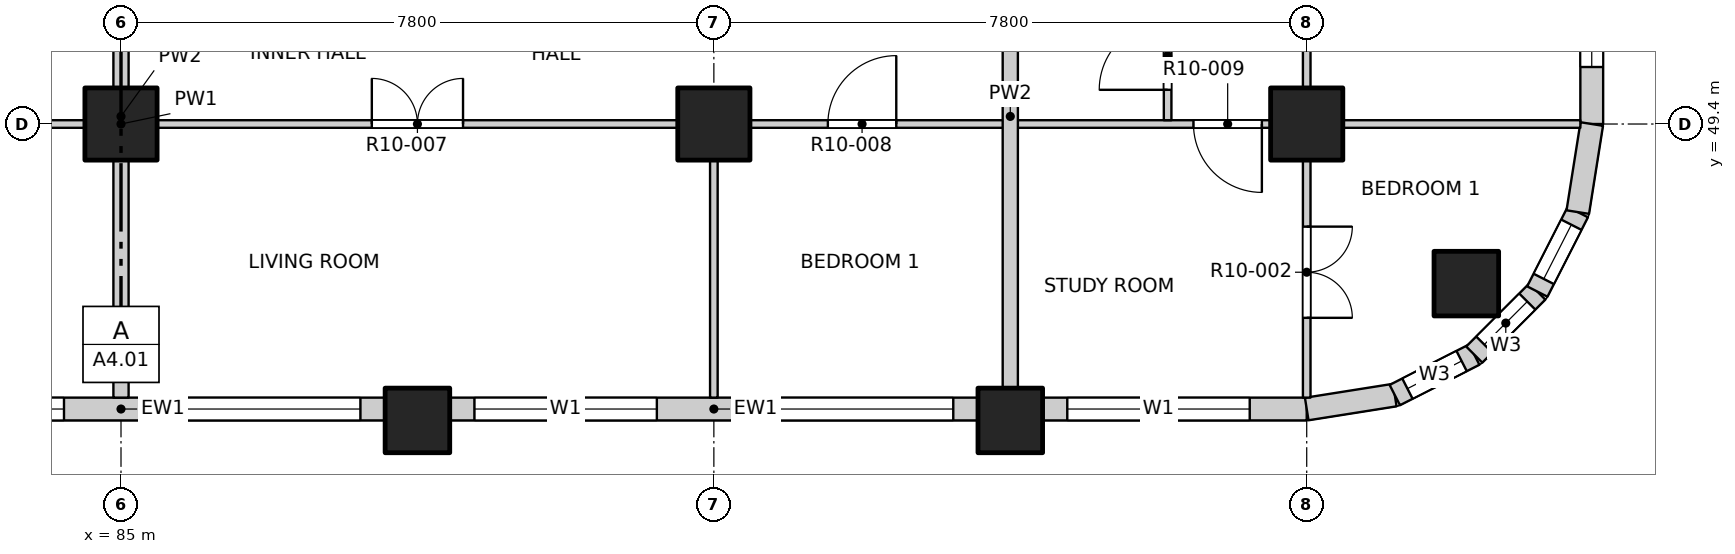
"""IFC4 building model, lengths in metres.
Left out: names, types, materials, properties, quantities, classifications, styles, units other than length and angle.
Written with IfcOpenShell. Run it as: python <this file> out.ifc"""

import sys

from ifc_helpers import new_model, si_unit, direction, frame, frame_2d, origin, origin_2d, place, context, subcontext, project, spatial, rectangle, extrude, element, fill, save


model = new_model("IFC4")
c1 = context("Model", 3, precision=1e-05, world=origin(), true_north=direction((0.0, 1.0)))
c2 = subcontext(c1, "Body", "Model", "MODEL_VIEW")
j1 = project(units=[si_unit("LENGTHUNIT", "METRE"), si_unit("PLANEANGLEUNIT", "RADIAN")], contexts=[c1])
p1 = place(None, origin())
s1 = spatial("IfcSite", under=j1, at=p1, CompositionType="ELEMENT")
p2 = place(p1, origin())
s2 = spatial("IfcBuilding", under=s1, at=p2, CompositionType="ELEMENT")
p3 = place(p2, frame((0.0, 0.0, 127.1)))
s3 = spatial("IfcBuildingStorey", under=s2, at=p3, CompositionType="ELEMENT", Elevation=127.1)
for number, where, z_axis, x_axis in (
    (1, (102.7, 47.3, -0.25), (0.0, 0.0, 1.0), (1.0, 0.0, 0.0)),
    (2, (88.9, 45.5, -0.25), (0.0, 0.0, 1.0), (1.0, 0.0, 0.0)),
    (3, (96.7, 45.5, -0.25), (0.0, 0.0, 1.0), (1.0, 0.0, 0.0)),
):
    element("IfcColumn", number, at=place(p3, frame(where, z_axis=z_axis, x_axis=x_axis)), inside=s3, PredefinedType="COLUMN", context=c2, shape_type="SweptSolid", body=[
        extrude(rectangle(XDim=0.85, YDim=0.85, at=origin_2d()), origin(), (0.0, 0.0, 1.0), 3.4),
    ])
for number, where, z_axis, x_axis in (
    (4, (85.0, 49.4, -0.25), (0.0, 0.0, 1.0), (1.0, 0.0, 0.0)),
    (5, (92.8, 49.4, -0.25), (0.0, 0.0, 1.0), (1.0, 0.0, 0.0)),
    (6, (100.6, 49.4, -0.25), (0.0, 0.0, 1.0), (1.0, 0.0, 0.0)),
):
    element("IfcColumn", number, at=place(p3, frame(where, z_axis=z_axis, x_axis=x_axis)), inside=s3, PredefinedType="COLUMN", context=c2, shape_type="SweptSolid", body=[
        extrude(rectangle(XDim=0.95, YDim=0.95, at=origin_2d()), origin(), (0.0, 0.0, 1.0), 3.4),
    ])
p4 = place(p3, frame((81.525, 45.65, 0.0), z_axis=(0.0, 0.0, 1.0), x_axis=(1.0, 0.0, 0.0)))
e7 = element("IfcWall", 7, at=p4, inside=s3, PredefinedType="SOLIDWALL", context=c2, shape_type="SweptSolid", body=[
    extrude(rectangle(XDim=6.95, YDim=0.3, at=frame_2d((3.475, 0.0))), origin(), (0.0, 0.0, 1.0), 2.7),
])
p5 = place(p4, frame((0.325, 0.0, 0.9)))
e8 = element("IfcOpeningElement", 8, at=p5, cuts=e7, PredefinedType="OPENING", context=c2, shape_type="SweptSolid", body=[
    extrude(rectangle(XDim=2.4, YDim=1.8, at=frame_2d((1.2, 0.9))), frame((0.0, 0.16, 0.0), z_axis=(0.0, -1.0, 0.0), x_axis=(1.0, 0.0, 0.0)), (0.0, 0.0, 1.0), 0.32),
])
p6 = place(p4, frame((4.225, 0.0, 0.9)))
e9 = element("IfcOpeningElement", 9, at=p6, cuts=e7, PredefinedType="OPENING", context=c2, shape_type="SweptSolid", body=[
    extrude(rectangle(XDim=2.4, YDim=1.8, at=frame_2d((1.2, 0.9))), frame((0.0, 0.16, 0.0), z_axis=(0.0, -1.0, 0.0), x_axis=(1.0, 0.0, 0.0)), (0.0, 0.0, 1.0), 0.32),
])
p7 = place(p3, frame((89.325, 45.65, 0.0), z_axis=(0.0, 0.0, 1.0), x_axis=(1.0, 0.0, 0.0)))
e10 = element("IfcWall", 10, at=p7, inside=s3, PredefinedType="SOLIDWALL", context=c2, shape_type="SweptSolid", body=[
    extrude(rectangle(XDim=6.95, YDim=0.3, at=frame_2d((3.475, 0.0))), origin(), (0.0, 0.0, 1.0), 2.7),
])
p8 = place(p7, frame((0.325, 0.0, 0.9)))
e11 = element("IfcOpeningElement", 11, at=p8, cuts=e10, PredefinedType="OPENING", context=c2, shape_type="SweptSolid", body=[
    extrude(rectangle(XDim=2.4, YDim=1.8, at=frame_2d((1.2, 0.9))), frame((0.0, 0.16, 0.0), z_axis=(0.0, -1.0, 0.0), x_axis=(1.0, 0.0, 0.0)), (0.0, 0.0, 1.0), 0.32),
])
p9 = place(p7, frame((4.225, 0.0, 0.9)))
e12 = element("IfcOpeningElement", 12, at=p9, cuts=e10, PredefinedType="OPENING", context=c2, shape_type="SweptSolid", body=[
    extrude(rectangle(XDim=2.4, YDim=1.8, at=frame_2d((1.2, 0.9))), frame((0.0, 0.16, 0.0), z_axis=(0.0, -1.0, 0.0), x_axis=(1.0, 0.0, 0.0)), (0.0, 0.0, 1.0), 0.32),
])
p10 = place(p3, frame((97.125, 45.65, 0.0), z_axis=(0.0, 0.0, 1.0), x_axis=(1.0, 0.0, 0.0)))
e13 = element("IfcWall", 13, at=p10, inside=s3, PredefinedType="SOLIDWALL", context=c2, shape_type="SweptSolid", body=[
    extrude(rectangle(XDim=3.475, YDim=0.3, at=frame_2d((1.738, 0.0))), origin(), (0.0, 0.0, 1.0), 2.7),
])
p11 = place(p10, frame((0.325, 0.0, 0.9)))
e14 = element("IfcOpeningElement", 14, at=p11, cuts=e13, PredefinedType="OPENING", context=c2, shape_type="SweptSolid", body=[
    extrude(rectangle(XDim=2.4, YDim=1.8, at=frame_2d((1.2, 0.9))), frame((0.0, 0.16, 0.0), z_axis=(0.0, -1.0, 0.0), x_axis=(1.0, 0.0, 0.0)), (0.0, 0.0, 1.0), 0.32),
])
p12 = place(p3, frame((104.35, 49.4, 0.0), z_axis=(0.0, 0.0, 1.0), x_axis=(0.0, 1.0, 0.0)))
e15 = element("IfcWall", 15, at=p12, inside=s3, PredefinedType="SOLIDWALL", context=c2, shape_type="SweptSolid", body=[
    extrude(rectangle(XDim=3.475, YDim=0.3, at=frame_2d((1.738, 0.0))), origin(), (0.0, 0.0, 1.0), 2.7),
])
p13 = place(p12, frame((0.75, 0.0, 0.9)))
e16 = element("IfcOpeningElement", 16, at=p13, cuts=e15, PredefinedType="OPENING", context=c2, shape_type="SweptSolid", body=[
    extrude(rectangle(XDim=2.4, YDim=1.8, at=frame_2d((1.2, 0.9))), frame((0.0, 0.16, 0.0), z_axis=(0.0, -1.0, 0.0), x_axis=(1.0, 0.0, 0.0)), (0.0, 0.0, 1.0), 0.32),
])
p14 = place(p3, frame((100.6, 45.65, 0.0), z_axis=(0.0, 0.0, 1.0), x_axis=(0.987678452879, 0.156496880861, 0.0)))
e17 = element("IfcWall", 17, at=p14, inside=s3, PredefinedType="SOLIDWALL", context=c2, shape_type="SweptSolid", body=[
    extrude(rectangle(XDim=1.173, YDim=0.3, at=frame_2d((0.586, 0.0))), origin(), (0.0, 0.0, 1.0), 2.7),
])
p15 = place(p3, frame((101.759, 45.833, 0.0), z_axis=(0.0, 0.0, 1.0), x_axis=(0.890988677504, 0.454025524128, 0.0)))
e18 = element("IfcWall", 18, at=p15, inside=s3, PredefinedType="SOLIDWALL", context=c2, shape_type="SweptSolid", body=[
    extrude(rectangle(XDim=1.173, YDim=0.3, at=frame_2d((0.587, 0.0))), origin(), (0.0, 0.0, 1.0), 2.7),
])
p16 = place(p15, frame((0.187, 0.0, 0.9)))
e19 = element("IfcOpeningElement", 19, at=p16, cuts=e18, PredefinedType="OPENING", context=c2, shape_type="SweptSolid", body=[
    extrude(rectangle(XDim=0.8, YDim=1.2, at=frame_2d((0.4, 0.6))), frame((0.0, 0.16, 0.0), z_axis=(0.0, -1.0, 0.0), x_axis=(1.0, 0.0, 0.0)), (0.0, 0.0, 1.0), 0.32),
])
p17 = place(p3, frame((102.804, 46.366, 0.0), z_axis=(0.0, 0.0, 1.0), x_axis=(0.707106781187, 0.707106781187, 0.0)))
e20 = element("IfcWall", 20, at=p17, inside=s3, PredefinedType="SOLIDWALL", context=c2, shape_type="SweptSolid", body=[
    extrude(rectangle(XDim=1.173, YDim=0.3, at=frame_2d((0.586, 0.0))), origin(), (0.0, 0.0, 1.0), 2.7),
])
p18 = place(p17, frame((0.187, 0.0, 0.9)))
e21 = element("IfcOpeningElement", 21, at=p18, cuts=e20, PredefinedType="OPENING", context=c2, shape_type="SweptSolid", body=[
    extrude(rectangle(XDim=0.8, YDim=1.2, at=frame_2d((0.4, 0.6))), frame((0.0, 0.16, 0.0), z_axis=(0.0, -1.0, 0.0), x_axis=(1.0, 0.0, 0.0)), (0.0, 0.0, 1.0), 0.32),
])
p19 = place(p3, frame((103.634, 47.196, 0.0), z_axis=(0.0, 0.0, 1.0), x_axis=(0.454025524128, 0.890988677504, 0.0)))
e22 = element("IfcWall", 22, at=p19, inside=s3, PredefinedType="SOLIDWALL", context=c2, shape_type="SweptSolid", body=[
    extrude(rectangle(XDim=1.173, YDim=0.3, at=frame_2d((0.587, 0.0))), origin(), (0.0, 0.0, 1.0), 2.7),
])
p20 = place(p19, frame((0.187, 0.0, 0.9)))
e23 = element("IfcOpeningElement", 23, at=p20, cuts=e22, PredefinedType="OPENING", context=c2, shape_type="SweptSolid", body=[
    extrude(rectangle(XDim=0.8, YDim=1.2, at=frame_2d((0.4, 0.6))), frame((0.0, 0.16, 0.0), z_axis=(0.0, -1.0, 0.0), x_axis=(1.0, 0.0, 0.0)), (0.0, 0.0, 1.0), 0.32),
])
p21 = place(p3, frame((104.167, 48.241, 0.0), z_axis=(0.0, 0.0, 1.0), x_axis=(0.156496880861, 0.987678452879, 0.0)))
e24 = element("IfcWall", 24, at=p21, inside=s3, PredefinedType="SOLIDWALL", context=c2, shape_type="SweptSolid", body=[
    extrude(rectangle(XDim=1.173, YDim=0.3, at=frame_2d((0.586, 0.0))), origin(), (0.0, 0.0, 1.0), 2.7),
])
p22 = place(p3, frame((65.8, 49.4, 0.0), z_axis=(0.0, 0.0, 1.0), x_axis=(1.0, 0.0, 0.0)))
e25 = element("IfcWall", 25, at=p22, inside=s3, PredefinedType="PARTITIONING", context=c2, shape_type="SweptSolid", body=[
    extrude(rectangle(XDim=38.4, YDim=0.1, at=frame_2d((19.2, 0.0))), origin(), (0.0, 0.0, 1.0), 3.15),
])
p23 = place(p22, frame((4.19, 0.0, 0.0)))
e26 = element("IfcOpeningElement", 26, at=p23, cuts=e25, PredefinedType="OPENING", context=c2, shape_type="SweptSolid", body=[
    extrude(rectangle(XDim=0.9, YDim=2.1, at=frame_2d((0.45, 1.05))), frame((0.0, 0.06, 0.0), z_axis=(0.0, -1.0, 0.0), x_axis=(1.0, 0.0, 0.0)), (0.0, 0.0, 1.0), 0.12),
])
p24 = place(p22, frame((9.0, 0.0, 0.0)))
e27 = element("IfcOpeningElement", 27, at=p24, cuts=e25, PredefinedType="OPENING", context=c2, shape_type="SweptSolid", body=[
    extrude(rectangle(XDim=0.9, YDim=2.1, at=frame_2d((0.45, 1.05))), frame((0.0, 0.06, 0.0), z_axis=(0.0, -1.0, 0.0), x_axis=(1.0, 0.0, 0.0)), (0.0, 0.0, 1.0), 0.12),
])
p25 = place(p22, frame((12.9, 0.0, 0.0)))
e28 = element("IfcOpeningElement", 28, at=p25, cuts=e25, PredefinedType="OPENING", context=c2, shape_type="SweptSolid", body=[
    extrude(rectangle(XDim=0.9, YDim=2.1, at=frame_2d((0.45, 1.05))), frame((0.0, 0.06, 0.0), z_axis=(0.0, -1.0, 0.0), x_axis=(1.0, 0.0, 0.0)), (0.0, 0.0, 1.0), 0.12),
])
p26 = place(p22, frame((16.8, 0.0, 0.0)))
e29 = element("IfcOpeningElement", 29, at=p26, cuts=e25, PredefinedType="OPENING", context=c2, shape_type="SweptSolid", body=[
    extrude(rectangle(XDim=0.9, YDim=2.1, at=frame_2d((0.45, 1.05))), frame((0.0, 0.06, 0.0), z_axis=(0.0, -1.0, 0.0), x_axis=(1.0, 0.0, 0.0)), (0.0, 0.0, 1.0), 0.12),
])
p27 = place(p22, frame((22.5, 0.0, 0.0)))
e30 = element("IfcOpeningElement", 30, at=p27, cuts=e25, PredefinedType="OPENING", context=c2, shape_type="SweptSolid", body=[
    extrude(rectangle(XDim=1.2, YDim=2.1, at=frame_2d((0.6, 1.05))), frame((0.0, 0.06, 0.0), z_axis=(0.0, -1.0, 0.0), x_axis=(1.0, 0.0, 0.0)), (0.0, 0.0, 1.0), 0.12),
])
p28 = place(p22, frame((28.5, 0.0, 0.0)))
e31 = element("IfcOpeningElement", 31, at=p28, cuts=e25, PredefinedType="OPENING", context=c2, shape_type="SweptSolid", body=[
    extrude(rectangle(XDim=0.9, YDim=2.1, at=frame_2d((0.45, 1.05))), frame((0.0, 0.06, 0.0), z_axis=(0.0, -1.0, 0.0), x_axis=(1.0, 0.0, 0.0)), (0.0, 0.0, 1.0), 0.12),
])
p29 = place(p22, frame((33.31, 0.0, 0.0)))
e32 = element("IfcOpeningElement", 32, at=p29, cuts=e25, PredefinedType="OPENING", context=c2, shape_type="SweptSolid", body=[
    extrude(rectangle(XDim=0.9, YDim=2.1, at=frame_2d((0.45, 1.05))), frame((0.0, 0.06, 0.0), z_axis=(0.0, -1.0, 0.0), x_axis=(1.0, 0.0, 0.0)), (0.0, 0.0, 1.0), 0.12),
])
p30 = place(p3, frame((85.0, 45.8, 0.0), z_axis=(0.0, 0.0, 1.0), x_axis=(0.0, 1.0, 0.0)))
e33 = element("IfcWall", 33, at=p30, inside=s3, PredefinedType="PARTITIONING", context=c2, shape_type="SweptSolid", body=[
    extrude(rectangle(XDim=7.4, YDim=0.2, at=frame_2d((3.7, 0.0))), origin(), (0.0, 0.0, 1.0), 3.15),
])
p31 = place(p3, frame((92.8, 45.8, 0.0), z_axis=(0.0, 0.0, 1.0), x_axis=(0.0, 1.0, 0.0)))
e34 = element("IfcWall", 34, at=p31, inside=s3, PredefinedType="PARTITIONING", context=c2, shape_type="SweptSolid", body=[
    extrude(rectangle(XDim=3.55, YDim=0.1, at=frame_2d((1.775, 0.0))), origin(), (0.0, 0.0, 1.0), 3.15),
])
p32 = place(p3, frame((96.7, 45.8, 0.0), z_axis=(0.0, 0.0, 1.0), x_axis=(0.0, 1.0, 0.0)))
e35 = element("IfcWall", 35, at=p32, inside=s3, PredefinedType="PARTITIONING", context=c2, shape_type="SweptSolid", body=[
    extrude(rectangle(XDim=7.4, YDim=0.2, at=frame_2d((3.7, 0.0))), origin(), (0.0, 0.0, 1.0), 3.15),
])
p33 = place(p3, frame((98.77, 49.45, 0.0), z_axis=(0.0, 0.0, 1.0), x_axis=(0.0, 1.0, 0.0)))
e36 = element("IfcWall", 36, at=p33, inside=s3, PredefinedType="PARTITIONING", context=c2, shape_type="SweptSolid", body=[
    extrude(rectangle(XDim=12.35, YDim=0.1, at=frame_2d((6.175, 0.0))), origin(), (0.0, 0.0, 1.0), 3.15),
])
p34 = place(p33, frame((0.4, 0.0, 0.0)))
e37 = element("IfcOpeningElement", 37, at=p34, cuts=e36, PredefinedType="OPENING", context=c2, shape_type="SweptSolid", body=[
    extrude(rectangle(XDim=0.9, YDim=2.1, at=frame_2d((0.45, 1.05))), frame((0.0, 0.06, 0.0), z_axis=(0.0, -1.0, 0.0), x_axis=(1.0, 0.0, 0.0)), (0.0, 0.0, 1.0), 0.12),
])
p35 = place(p33, frame((2.65, 0.0, 0.0)))
e38 = element("IfcOpeningElement", 38, at=p35, cuts=e36, PredefinedType="OPENING", context=c2, shape_type="SweptSolid", body=[
    extrude(rectangle(XDim=0.8, YDim=2.1, at=frame_2d((0.4, 1.05))), frame((0.0, 0.06, 0.0), z_axis=(0.0, -1.0, 0.0), x_axis=(1.0, 0.0, 0.0)), (0.0, 0.0, 1.0), 0.12),
])
p36 = place(p33, frame((5.29, 0.0, 0.0)))
e39 = element("IfcOpeningElement", 39, at=p36, cuts=e36, PredefinedType="OPENING", context=c2, shape_type="SweptSolid", body=[
    extrude(rectangle(XDim=0.8, YDim=2.1, at=frame_2d((0.4, 1.05))), frame((0.0, 0.06, 0.0), z_axis=(0.0, -1.0, 0.0), x_axis=(1.0, 0.0, 0.0)), (0.0, 0.0, 1.0), 0.12),
])
p37 = place(p33, frame((8.115, 0.0, 0.0)))
e40 = element("IfcOpeningElement", 40, at=p37, cuts=e36, PredefinedType="OPENING", context=c2, shape_type="SweptSolid", body=[
    extrude(rectangle(XDim=0.9, YDim=2.1, at=frame_2d((0.45, 1.05))), frame((0.0, 0.06, 0.0), z_axis=(0.0, -1.0, 0.0), x_axis=(1.0, 0.0, 0.0)), (0.0, 0.0, 1.0), 0.12),
])
p38 = place(p33, frame((10.85, 0.0, 0.0)))
e41 = element("IfcOpeningElement", 41, at=p38, cuts=e36, PredefinedType="OPENING", context=c2, shape_type="SweptSolid", body=[
    extrude(rectangle(XDim=0.8, YDim=2.1, at=frame_2d((0.4, 1.05))), frame((0.0, 0.06, 0.0), z_axis=(0.0, -1.0, 0.0), x_axis=(1.0, 0.0, 0.0)), (0.0, 0.0, 1.0), 0.12),
])
p39 = place(p3, frame((100.6, 45.8, 0.0), z_axis=(0.0, 0.0, 1.0), x_axis=(0.0, 1.0, 0.0)))
e42 = element("IfcWall", 42, at=p39, inside=s3, PredefinedType="PARTITIONING", context=c2, shape_type="SweptSolid", body=[
    extrude(rectangle(XDim=38.4, YDim=0.1, at=frame_2d((19.2, 0.0))), origin(), (0.0, 0.0, 1.0), 3.15),
])
p40 = place(p39, frame((1.05, 0.0, 0.0)))
e43 = element("IfcOpeningElement", 43, at=p40, cuts=e42, PredefinedType="OPENING", context=c2, shape_type="SweptSolid", body=[
    extrude(rectangle(XDim=1.2, YDim=2.1, at=frame_2d((0.6, 1.05))), frame((0.0, 0.06, 0.0), z_axis=(0.0, -1.0, 0.0), x_axis=(1.0, 0.0, 0.0)), (0.0, 0.0, 1.0), 0.12),
])
p41 = place(p39, frame((6.9, 0.0, 0.0)))
e44 = element("IfcOpeningElement", 44, at=p41, cuts=e42, PredefinedType="OPENING", context=c2, shape_type="SweptSolid", body=[
    extrude(rectangle(XDim=1.2, YDim=2.1, at=frame_2d((0.6, 1.05))), frame((0.0, 0.06, 0.0), z_axis=(0.0, -1.0, 0.0), x_axis=(1.0, 0.0, 0.0)), (0.0, 0.0, 1.0), 0.12),
])
p42 = place(p39, frame((12.9, 0.0, 0.0)))
e45 = element("IfcOpeningElement", 45, at=p42, cuts=e42, PredefinedType="OPENING", context=c2, shape_type="SweptSolid", body=[
    extrude(rectangle(XDim=0.9, YDim=2.1, at=frame_2d((0.45, 1.05))), frame((0.0, 0.06, 0.0), z_axis=(0.0, -1.0, 0.0), x_axis=(1.0, 0.0, 0.0)), (0.0, 0.0, 1.0), 0.12),
])
p43 = place(p39, frame((16.8, 0.0, 0.0)))
e46 = element("IfcOpeningElement", 46, at=p43, cuts=e42, PredefinedType="OPENING", context=c2, shape_type="SweptSolid", body=[
    extrude(rectangle(XDim=0.9, YDim=2.1, at=frame_2d((0.45, 1.05))), frame((0.0, 0.06, 0.0), z_axis=(0.0, -1.0, 0.0), x_axis=(1.0, 0.0, 0.0)), (0.0, 0.0, 1.0), 0.12),
])
p44 = place(p39, frame((20.7, 0.0, 0.0)))
e47 = element("IfcOpeningElement", 47, at=p44, cuts=e42, PredefinedType="OPENING", context=c2, shape_type="SweptSolid", body=[
    extrude(rectangle(XDim=0.9, YDim=2.1, at=frame_2d((0.45, 1.05))), frame((0.0, 0.06, 0.0), z_axis=(0.0, -1.0, 0.0), x_axis=(1.0, 0.0, 0.0)), (0.0, 0.0, 1.0), 0.12),
])
p45 = place(p39, frame((27.575, 0.0, 0.0)))
e48 = element("IfcOpeningElement", 48, at=p45, cuts=e42, PredefinedType="OPENING", context=c2, shape_type="SweptSolid", body=[
    extrude(rectangle(XDim=1.2, YDim=2.1, at=frame_2d((0.6, 1.05))), frame((0.0, 0.06, 0.0), z_axis=(0.0, -1.0, 0.0), x_axis=(1.0, 0.0, 0.0)), (0.0, 0.0, 1.0), 0.12),
])
p46 = place(p39, frame((32.4, 0.0, 0.0)))
e49 = element("IfcOpeningElement", 49, at=p46, cuts=e42, PredefinedType="OPENING", context=c2, shape_type="SweptSolid", body=[
    extrude(rectangle(XDim=0.9, YDim=2.1, at=frame_2d((0.45, 1.05))), frame((0.0, 0.06, 0.0), z_axis=(0.0, -1.0, 0.0), x_axis=(1.0, 0.0, 0.0)), (0.0, 0.0, 1.0), 0.12),
])
p47 = place(p39, frame((36.15, 0.0, 0.0)))
e50 = element("IfcOpeningElement", 50, at=p47, cuts=e42, PredefinedType="OPENING", context=c2, shape_type="SweptSolid", body=[
    extrude(rectangle(XDim=1.2, YDim=2.1, at=frame_2d((0.6, 1.05))), frame((0.0, 0.06, 0.0), z_axis=(0.0, -1.0, 0.0), x_axis=(1.0, 0.0, 0.0)), (0.0, 0.0, 1.0), 0.12),
])
p48 = place(p5, origin())
e51 = element("IfcWindow", 51, at=p48, inside=s3, PartitioningType="DOUBLE_PANEL_VERTICAL", PredefinedType="WINDOW", context=c2, shape_type="SweptSolid", body=[
    extrude(rectangle(XDim=2.4, YDim=1.8, at=frame_2d((1.2, 0.9))), frame((0.0, 0.03, 0.0), z_axis=(0.0, -1.0, 0.0), x_axis=(1.0, 0.0, 0.0)), (0.0, 0.0, 1.0), 0.06),
])
fill(e8, e51)
p49 = place(p6, origin())
e52 = element("IfcWindow", 52, at=p49, inside=s3, PartitioningType="DOUBLE_PANEL_VERTICAL", PredefinedType="WINDOW", context=c2, shape_type="SweptSolid", body=[
    extrude(rectangle(XDim=2.4, YDim=1.8, at=frame_2d((1.2, 0.9))), frame((0.0, 0.03, 0.0), z_axis=(0.0, -1.0, 0.0), x_axis=(1.0, 0.0, 0.0)), (0.0, 0.0, 1.0), 0.06),
])
fill(e9, e52)
p50 = place(p8, origin())
e53 = element("IfcWindow", 53, at=p50, inside=s3, PartitioningType="DOUBLE_PANEL_VERTICAL", PredefinedType="WINDOW", context=c2, shape_type="SweptSolid", body=[
    extrude(rectangle(XDim=2.4, YDim=1.8, at=frame_2d((1.2, 0.9))), frame((0.0, 0.03, 0.0), z_axis=(0.0, -1.0, 0.0), x_axis=(1.0, 0.0, 0.0)), (0.0, 0.0, 1.0), 0.06),
])
fill(e11, e53)
p51 = place(p9, origin())
e54 = element("IfcWindow", 54, at=p51, inside=s3, PartitioningType="DOUBLE_PANEL_VERTICAL", PredefinedType="WINDOW", context=c2, shape_type="SweptSolid", body=[
    extrude(rectangle(XDim=2.4, YDim=1.8, at=frame_2d((1.2, 0.9))), frame((0.0, 0.03, 0.0), z_axis=(0.0, -1.0, 0.0), x_axis=(1.0, 0.0, 0.0)), (0.0, 0.0, 1.0), 0.06),
])
fill(e12, e54)
p52 = place(p11, origin())
e55 = element("IfcWindow", 55, at=p52, inside=s3, PartitioningType="DOUBLE_PANEL_VERTICAL", PredefinedType="WINDOW", context=c2, shape_type="SweptSolid", body=[
    extrude(rectangle(XDim=2.4, YDim=1.8, at=frame_2d((1.2, 0.9))), frame((0.0, 0.03, 0.0), z_axis=(0.0, -1.0, 0.0), x_axis=(1.0, 0.0, 0.0)), (0.0, 0.0, 1.0), 0.06),
])
fill(e14, e55)
p53 = place(p13, origin())
e56 = element("IfcWindow", 56, at=p53, inside=s3, PartitioningType="DOUBLE_PANEL_VERTICAL", PredefinedType="WINDOW", context=c2, shape_type="SweptSolid", body=[
    extrude(rectangle(XDim=2.4, YDim=1.8, at=frame_2d((1.2, 0.9))), frame((0.0, 0.03, 0.0), z_axis=(0.0, -1.0, 0.0), x_axis=(1.0, 0.0, 0.0)), (0.0, 0.0, 1.0), 0.06),
])
fill(e16, e56)
p54 = place(p16, origin())
e57 = element("IfcWindow", 57, at=p54, inside=s3, PartitioningType="SINGLE_PANEL", PredefinedType="WINDOW", context=c2, shape_type="SweptSolid", body=[
    extrude(rectangle(XDim=0.8, YDim=1.2, at=frame_2d((0.4, 0.6))), frame((0.0, 0.03, 0.0), z_axis=(0.0, -1.0, 0.0), x_axis=(1.0, 0.0, 0.0)), (0.0, 0.0, 1.0), 0.06),
])
fill(e19, e57)
p55 = place(p18, origin())
e58 = element("IfcWindow", 58, at=p55, inside=s3, PartitioningType="SINGLE_PANEL", PredefinedType="WINDOW", context=c2, shape_type="SweptSolid", body=[
    extrude(rectangle(XDim=0.8, YDim=1.2, at=frame_2d((0.4, 0.6))), frame((0.0, 0.03, 0.0), z_axis=(0.0, -1.0, 0.0), x_axis=(1.0, 0.0, 0.0)), (0.0, 0.0, 1.0), 0.06),
])
fill(e21, e58)
p56 = place(p20, origin())
e59 = element("IfcWindow", 59, at=p56, inside=s3, PartitioningType="SINGLE_PANEL", PredefinedType="WINDOW", context=c2, shape_type="SweptSolid", body=[
    extrude(rectangle(XDim=0.8, YDim=1.2, at=frame_2d((0.4, 0.6))), frame((0.0, 0.03, 0.0), z_axis=(0.0, -1.0, 0.0), x_axis=(1.0, 0.0, 0.0)), (0.0, 0.0, 1.0), 0.06),
])
fill(e23, e59)
p57 = place(p40, origin())
e60 = element("IfcDoor", 60, at=p57, inside=s3, OperationType="DOUBLE_DOOR_SINGLE_SWING", PredefinedType="DOOR", context=c2, shape_type="SweptSolid", body=[
    extrude(rectangle(XDim=1.2, YDim=2.1, at=frame_2d((0.6, 1.05))), frame((0.0, 0.025, 0.0), z_axis=(0.0, -1.0, 0.0), x_axis=(1.0, 0.0, 0.0)), (0.0, 0.0, 1.0), 0.05),
])
fill(e43, e60)
p58 = place(p27, origin())
e61 = element("IfcDoor", 61, at=p58, inside=s3, OperationType="DOUBLE_DOOR_SINGLE_SWING", PredefinedType="DOOR", context=c2, shape_type="SweptSolid", body=[
    extrude(rectangle(XDim=1.2, YDim=2.1, at=frame_2d((0.6, 1.05))), frame((0.0, 0.025, 0.0), z_axis=(0.0, -1.0, 0.0), x_axis=(1.0, 0.0, 0.0)), (0.0, 0.0, 1.0), 0.05),
])
fill(e30, e61)
p59 = place(p28, origin())
e62 = element("IfcDoor", 62, at=p59, inside=s3, OperationType="SINGLE_SWING_RIGHT", PredefinedType="DOOR", context=c2, shape_type="SweptSolid", body=[
    extrude(rectangle(XDim=0.9, YDim=2.1, at=frame_2d((0.45, 1.05))), frame((0.0, 0.025, 0.0), z_axis=(0.0, -1.0, 0.0), x_axis=(1.0, 0.0, 0.0)), (0.0, 0.0, 1.0), 0.05),
])
fill(e31, e62)
p60 = place(p29, origin())
e63 = element("IfcDoor", 63, at=p60, inside=s3, OperationType="SINGLE_SWING_LEFT", PredefinedType="DOOR", context=c2, shape_type="SweptSolid", body=[
    extrude(rectangle(XDim=0.9, YDim=2.1, at=frame_2d((0.45, 1.05))), frame((0.0, 0.025, 0.0), z_axis=(0.0, -1.0, 0.0), x_axis=(1.0, 0.0, 0.0)), (0.0, 0.0, 1.0), 0.05),
])
fill(e32, e63)
p61 = place(p34, origin())
e64 = element("IfcDoor", 64, at=p61, inside=s3, OperationType="SINGLE_SWING_LEFT", PredefinedType="DOOR", context=c2, shape_type="SweptSolid", body=[
    extrude(rectangle(XDim=0.9, YDim=2.1, at=frame_2d((0.45, 1.05))), frame((0.0, 0.025, 0.0), z_axis=(0.0, -1.0, 0.0), x_axis=(1.0, 0.0, 0.0)), (0.0, 0.0, 1.0), 0.05),
])
fill(e37, e64)
save(model, sys.argv[1])
